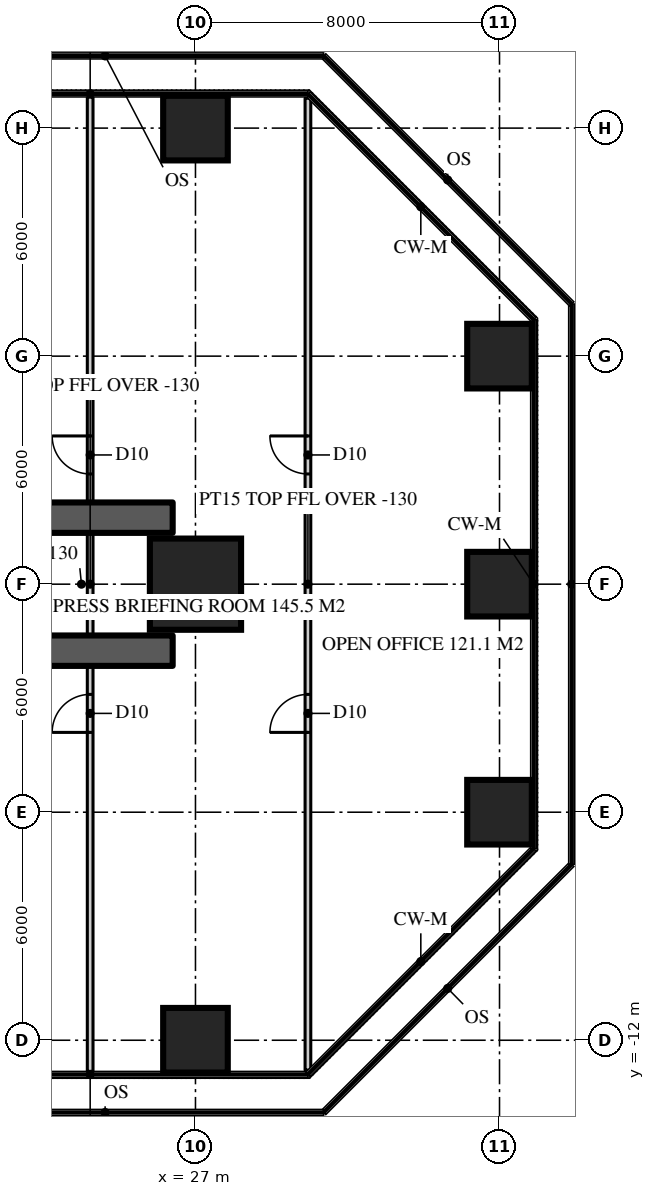
"""IFC4 building model, lengths in metres.
Left out: names, types, materials, properties, quantities, classifications, styles, units other than length and angle.
Written with IfcOpenShell. Run it as: python <this file> out.ifc"""

import sys

from ifc_helpers import new_model, si_unit, direction, frame, frame_2d, origin, origin_2d, place, context, subcontext, project, spatial, rectangle, extrude, element, fill, save


model = new_model("IFC4")
c1 = context("Model", 3, precision=1e-05, world=origin(), true_north=direction((0.0, 1.0)))
c2 = subcontext(c1, "Body", "Model", "MODEL_VIEW")
j1 = project(units=[si_unit("LENGTHUNIT", "METRE"), si_unit("PLANEANGLEUNIT", "RADIAN")], contexts=[c1])
p1 = place(None, origin())
s1 = spatial("IfcSite", under=j1, at=p1, CompositionType="ELEMENT")
p2 = place(p1, origin())
s2 = spatial("IfcBuilding", under=s1, at=p2, CompositionType="ELEMENT")
p3 = place(p2, frame((0.0, 0.0, 171.0)))
s3 = spatial("IfcBuildingStorey", under=s2, at=p3, CompositionType="ELEMENT", Elevation=171.0)
for number, where, z_axis, x_axis in (
    (1, (11.15, -1.75, 0.0), (0.0, 0.0, 1.0), (1.0, 0.0, 0.0)),
    (2, (11.15, 1.75, 0.0), (0.0, 0.0, 1.0), (1.0, 0.0, 0.0)),
):
    element("IfcWall", number, at=place(p3, frame(where, z_axis=z_axis, x_axis=x_axis)), inside=s3, PredefinedType="SHEAR", context=c2, shape_type="SweptSolid", body=[
        extrude(rectangle(XDim=15.25, YDim=0.8, at=frame_2d((7.625, 0.0))), origin(), (0.0, 0.0, 1.0), 3.9),
    ])
for number, where, z_axis, x_axis in (
    (3, (27.0, -12.0, 0.0), (0.0, 0.0, 1.0), (1.0, 0.0, 0.0)),
    (4, (35.0, -6.0, 0.0), (0.0, 0.0, 1.0), (1.0, 0.0, 0.0)),
):
    element("IfcColumn", number, at=place(p3, frame(where, z_axis=z_axis, x_axis=x_axis)), inside=s3, PredefinedType="COLUMN", context=c2, shape_type="SweptSolid", body=[
        extrude(rectangle(XDim=1.7, YDim=1.7, at=origin_2d()), origin(), (0.0, 0.0, 1.0), 3.9),
    ])
p4 = place(p3, frame((27.0, 0.0, 0.0), z_axis=(0.0, 0.0, 1.0), x_axis=(1.0, 0.0, 0.0)))
e5 = element("IfcColumn", 5, at=p4, inside=s3, PredefinedType="COLUMN", context=c2, shape_type="SweptSolid", body=[
    extrude(rectangle(XDim=2.4, YDim=2.4, at=origin_2d()), origin(), (0.0, 0.0, 1.0), 3.9),
])
for number, where, z_axis, x_axis in (
    (6, (35.0, 0.0, 0.0), (0.0, 0.0, 1.0), (1.0, 0.0, 0.0)),
    (7, (35.0, 6.0, 0.0), (0.0, 0.0, 1.0), (1.0, 0.0, 0.0)),
    (8, (27.0, 12.0, 0.0), (0.0, 0.0, 1.0), (1.0, 0.0, 0.0)),
):
    element("IfcColumn", number, at=place(p3, frame(where, z_axis=z_axis, x_axis=x_axis)), inside=s3, PredefinedType="COLUMN", context=c2, shape_type="SweptSolid", body=[
        extrude(rectangle(XDim=1.7, YDim=1.7, at=origin_2d()), origin(), (0.0, 0.0, 1.0), 3.9),
    ])
p5 = place(p3, frame((24.229, -12.82, 0.0), z_axis=(0.0, 0.0, 1.0), x_axis=(0.0, 1.0, 0.0)))
e9 = element("IfcWall", 9, at=p5, inside=s3, PredefinedType="PARTITIONING", context=c2, shape_type="SweptSolid", body=[
    extrude(rectangle(XDim=25.64, YDim=0.15, at=frame_2d((12.82, 0.0))), origin(), (0.0, 0.0, 1.0), 3.77),
])
p6 = place(p5, frame((15.72, 0.0, 0.0)))
e10 = element("IfcOpeningElement", 10, at=p6, cuts=e9, PredefinedType="OPENING", context=c2, shape_type="SweptSolid", body=[
    extrude(rectangle(XDim=1.0, YDim=2.2, at=frame_2d((0.5, 1.1))), frame((0.0, 0.085, 0.0), z_axis=(0.0, -1.0, 0.0), x_axis=(1.0, 0.0, 0.0)), (0.0, 0.0, 1.0), 0.17),
])
p7 = place(p5, frame((8.92, 0.0, 0.0)))
e11 = element("IfcOpeningElement", 11, at=p7, cuts=e9, PredefinedType="OPENING", context=c2, shape_type="SweptSolid", body=[
    extrude(rectangle(XDim=1.0, YDim=2.2, at=frame_2d((0.5, 1.1))), frame((0.0, 0.085, 0.0), z_axis=(0.0, -1.0, 0.0), x_axis=(1.0, 0.0, 0.0)), (0.0, 0.0, 1.0), 0.17),
])
p8 = place(p3, frame((29.959, -12.786, 0.0), z_axis=(0.0, 0.0, 1.0), x_axis=(0.0, 1.0, 0.0)))
e12 = element("IfcWall", 12, at=p8, inside=s3, PredefinedType="PARTITIONING", context=c2, shape_type="SweptSolid", body=[
    extrude(rectangle(XDim=25.573, YDim=0.15, at=frame_2d((12.786, 0.0))), origin(), (0.0, 0.0, 1.0), 3.77),
])
p9 = place(p8, frame((15.687, 0.0, 0.0)))
e13 = element("IfcOpeningElement", 13, at=p9, cuts=e12, PredefinedType="OPENING", context=c2, shape_type="SweptSolid", body=[
    extrude(rectangle(XDim=1.0, YDim=2.2, at=frame_2d((0.5, 1.1))), frame((0.0, 0.085, 0.0), z_axis=(0.0, -1.0, 0.0), x_axis=(1.0, 0.0, 0.0)), (0.0, 0.0, 1.0), 0.17),
])
p10 = place(p8, frame((8.886, 0.0, 0.0)))
e14 = element("IfcOpeningElement", 14, at=p10, cuts=e12, PredefinedType="OPENING", context=c2, shape_type="SweptSolid", body=[
    extrude(rectangle(XDim=1.0, YDim=2.2, at=frame_2d((0.5, 1.1))), frame((0.0, 0.085, 0.0), z_axis=(0.0, -1.0, 0.0), x_axis=(1.0, 0.0, 0.0)), (0.0, 0.0, 1.0), 0.17),
])
p11 = place(p6, origin())
e15 = element("IfcDoor", 15, at=p11, inside=s3, OperationType="SINGLE_SWING_RIGHT", PredefinedType="DOOR", context=c2, shape_type="SweptSolid", body=[
    extrude(rectangle(XDim=1.0, YDim=2.2, at=frame_2d((0.5, 1.1))), frame((0.0, 0.025, 0.0), z_axis=(0.0, -1.0, 0.0), x_axis=(1.0, 0.0, 0.0)), (0.0, 0.0, 1.0), 0.05),
])
fill(e10, e15)
p12 = place(p7, origin())
e16 = element("IfcDoor", 16, at=p12, inside=s3, OperationType="SINGLE_SWING_LEFT", PredefinedType="DOOR", context=c2, shape_type="SweptSolid", body=[
    extrude(rectangle(XDim=1.0, YDim=2.2, at=frame_2d((0.5, 1.1))), frame((0.0, 0.025, 0.0), z_axis=(0.0, -1.0, 0.0), x_axis=(1.0, 0.0, 0.0)), (0.0, 0.0, 1.0), 0.05),
])
fill(e11, e16)
p13 = place(p9, origin())
e17 = element("IfcDoor", 17, at=p13, inside=s3, OperationType="SINGLE_SWING_RIGHT", PredefinedType="DOOR", context=c2, shape_type="SweptSolid", body=[
    extrude(rectangle(XDim=1.0, YDim=2.2, at=frame_2d((0.5, 1.1))), frame((0.0, 0.025, 0.0), z_axis=(0.0, -1.0, 0.0), x_axis=(1.0, 0.0, 0.0)), (0.0, 0.0, 1.0), 0.05),
])
fill(e13, e17)
p14 = place(p10, origin())
e18 = element("IfcDoor", 18, at=p14, inside=s3, OperationType="SINGLE_SWING_LEFT", PredefinedType="DOOR", context=c2, shape_type="SweptSolid", body=[
    extrude(rectangle(XDim=1.0, YDim=2.2, at=frame_2d((0.5, 1.1))), frame((0.0, 0.025, 0.0), z_axis=(0.0, -1.0, 0.0), x_axis=(1.0, 0.0, 0.0)), (0.0, 0.0, 1.0), 0.05),
])
fill(e14, e18)
save(model, sys.argv[1])
